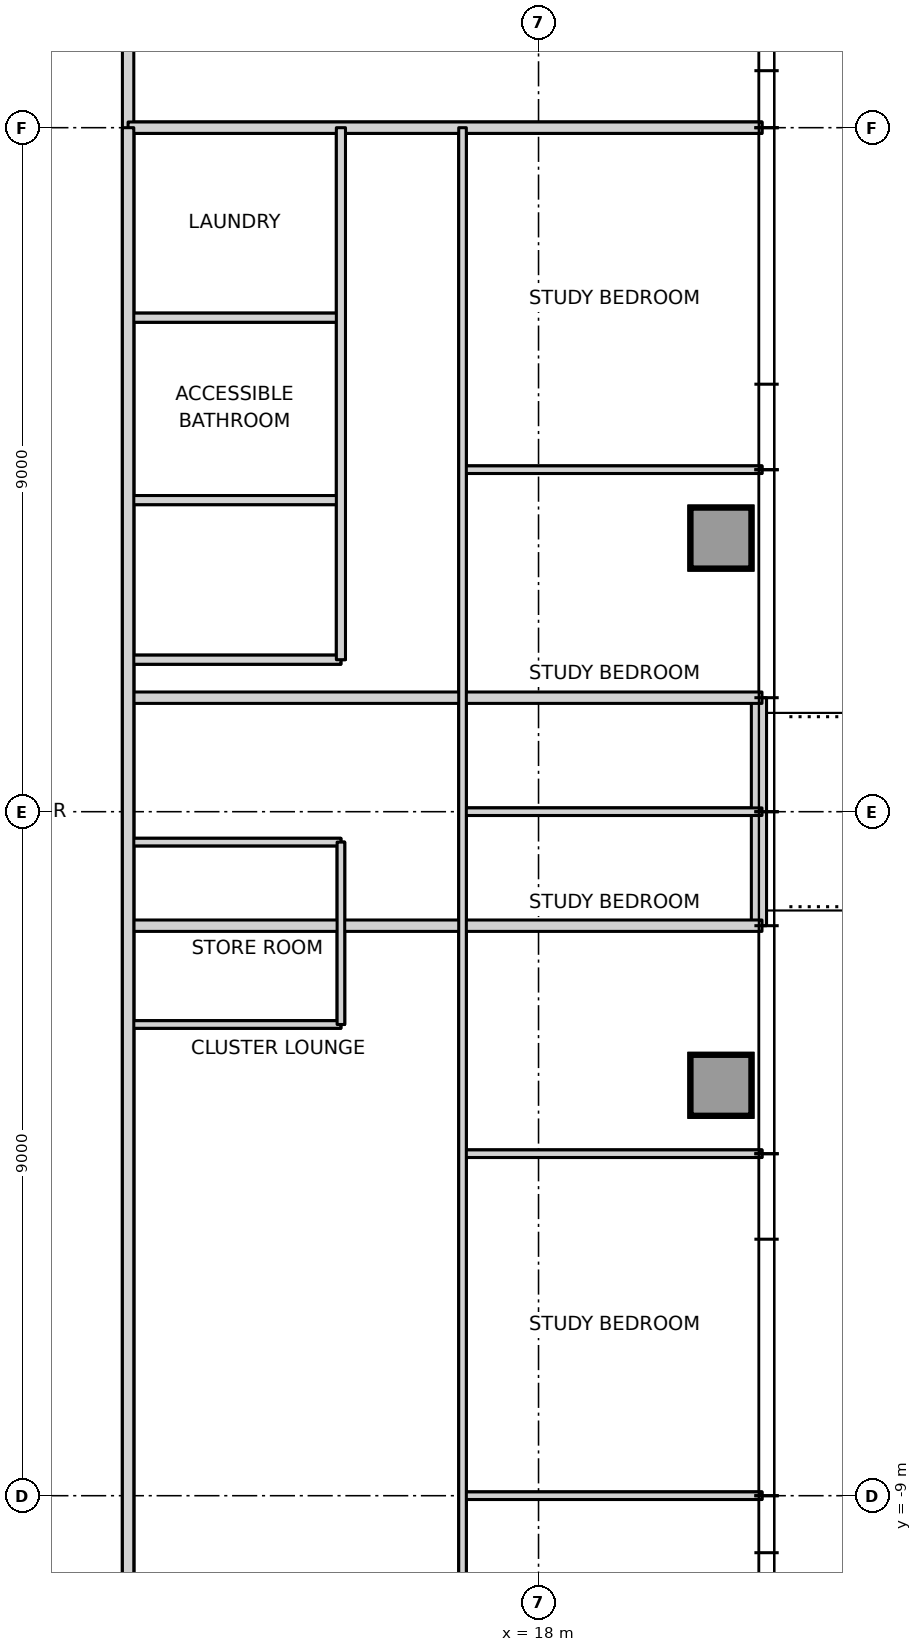
"""IFC4 building model, lengths in metres.
Left out: names, types, materials, properties, quantities, classifications, styles, units other than length and angle.
Written with IfcOpenShell. Run it as: python <this file> out.ifc"""

import sys

from ifc_helpers import new_model, si_unit, direction, frame, frame_2d, origin, origin_2d, place, context, subcontext, project, spatial, rectangle, hollow_rectangle, extrude, element, fill, save


model = new_model("IFC4")
c1 = context("Model", 3, precision=1e-05, world=origin(), true_north=direction((0.0, 1.0)))
c2 = subcontext(c1, "Body", "Model", "MODEL_VIEW")
j1 = project(units=[si_unit("LENGTHUNIT", "METRE"), si_unit("PLANEANGLEUNIT", "RADIAN")], contexts=[c1])
p1 = place(None, origin())
s1 = spatial("IfcSite", under=j1, at=p1, CompositionType="ELEMENT")
p2 = place(p1, origin())
s2 = spatial("IfcBuilding", under=s1, at=p2, CompositionType="ELEMENT")
p3 = place(p2, frame((0.0, 0.0, 94.5)))
s3 = spatial("IfcBuildingStorey", under=s2, at=p3, CompositionType="ELEMENT", Elevation=94.5)
for number, where, z_axis, x_axis in (
    (1, (20.4, -3.6, 0.0), (0.0, 0.0, 1.0), (1.0, 0.0, 0.0)),
    (2, (20.4, 3.6, 0.0), (0.0, 0.0, 1.0), (1.0, 0.0, 0.0)),
):
    element("IfcColumn", number, at=place(p3, frame(where, z_axis=z_axis, x_axis=x_axis)), inside=s3, PredefinedType="COLUMN", context=c2, shape_type="SweptSolid", body=[
        extrude(hollow_rectangle(XDim=0.8, YDim=0.8, WallThickness=0.07, at=origin_2d()), origin(), (0.0, 0.0, 1.0), 3.5),
    ])
for number, where, z_axis, x_axis in (
    (3, (17.0, -9.0, 0.0), (0.0, 0.0, 1.0), (1.0, 0.0, 0.0)),
    (4, (17.0, -4.5, 0.0), (0.0, 0.0, 1.0), (1.0, 0.0, 0.0)),
):
    element("IfcWall", number, at=place(p3, frame(where, z_axis=z_axis, x_axis=x_axis)), inside=s3, PredefinedType="PARTITIONING", context=c2, shape_type="SweptSolid", body=[
        extrude(rectangle(XDim=3.94, YDim=0.1, at=frame_2d((1.97, 0.0))), origin(), (0.0, 0.0, 1.0), 3.27),
    ])
p4 = place(p3, frame((12.6, -2.8, 0.0), z_axis=(0.0, 0.0, 1.0), x_axis=(1.0, 0.0, 0.0)))
e5 = element("IfcWall", 5, at=p4, inside=s3, PredefinedType="PARTITIONING", context=c2, shape_type="SweptSolid", body=[
    extrude(rectangle(XDim=2.8, YDim=0.1, at=frame_2d((1.4, 0.0))), origin(), (0.0, 0.0, 1.0), 3.27),
])
p5 = place(p4, frame((0.975, 0.0, 0.0)))
e6 = element("IfcOpeningElement", 6, at=p5, cuts=e5, PredefinedType="OPENING", context=c2, shape_type="SweptSolid", body=[
    extrude(rectangle(XDim=0.85, YDim=2.1, at=frame_2d((0.425, 1.05))), frame((0.0, 0.06, 0.0), z_axis=(0.0, -1.0, 0.0), x_axis=(1.0, 0.0, 0.0)), (0.0, 0.0, 1.0), 0.12),
])
p6 = place(p3, frame((12.6, -0.4, 0.0), z_axis=(0.0, 0.0, 1.0), x_axis=(1.0, 0.0, 0.0)))
e7 = element("IfcWall", 7, at=p6, inside=s3, PredefinedType="PARTITIONING", context=c2, shape_type="SweptSolid", body=[
    extrude(rectangle(XDim=2.8, YDim=0.1, at=frame_2d((1.4, 0.0))), origin(), (0.0, 0.0, 1.0), 3.27),
])
p7 = place(p3, frame((17.0, 0.0, 0.0), z_axis=(0.0, 0.0, 1.0), x_axis=(1.0, 0.0, 0.0)))
e8 = element("IfcWall", 8, at=p7, inside=s3, PredefinedType="PARTITIONING", context=c2, shape_type="SweptSolid", body=[
    extrude(rectangle(XDim=3.94, YDim=0.1, at=frame_2d((1.97, 0.0))), origin(), (0.0, 0.0, 1.0), 2.587),
])
p8 = place(p3, frame((12.6, 2.0, 0.0), z_axis=(0.0, 0.0, 1.0), x_axis=(1.0, 0.0, 0.0)))
e9 = element("IfcWall", 9, at=p8, inside=s3, PredefinedType="PARTITIONING", context=c2, shape_type="SweptSolid", body=[
    extrude(rectangle(XDim=2.8, YDim=0.12, at=frame_2d((1.4, 0.0))), origin(), (0.0, 0.0, 1.0), 3.27),
])
p9 = place(p8, frame((0.975, 0.0, 0.0)))
e10 = element("IfcOpeningElement", 10, at=p9, cuts=e9, PredefinedType="OPENING", context=c2, shape_type="SweptSolid", body=[
    extrude(rectangle(XDim=0.85, YDim=2.1, at=frame_2d((0.425, 1.05))), frame((0.0, 0.07, 0.0), z_axis=(0.0, -1.0, 0.0), x_axis=(1.0, 0.0, 0.0)), (0.0, 0.0, 1.0), 0.14),
])
p10 = place(p3, frame((12.6, 4.1, 0.0), z_axis=(0.0, 0.0, 1.0), x_axis=(1.0, 0.0, 0.0)))
e11 = element("IfcWall", 11, at=p10, inside=s3, PredefinedType="PARTITIONING", context=c2, shape_type="SweptSolid", body=[
    extrude(rectangle(XDim=2.8, YDim=0.12, at=frame_2d((1.4, 0.0))), origin(), (0.0, 0.0, 1.0), 3.27),
])
p11 = place(p3, frame((17.0, 4.5, 0.0), z_axis=(0.0, 0.0, 1.0), x_axis=(1.0, 0.0, 0.0)))
e12 = element("IfcWall", 12, at=p11, inside=s3, PredefinedType="PARTITIONING", context=c2, shape_type="SweptSolid", body=[
    extrude(rectangle(XDim=3.94, YDim=0.1, at=frame_2d((1.97, 0.0))), origin(), (0.0, 0.0, 1.0), 3.27),
])
p12 = place(p3, frame((12.6, 6.5, 0.0), z_axis=(0.0, 0.0, 1.0), x_axis=(1.0, 0.0, 0.0)))
e13 = element("IfcWall", 13, at=p12, inside=s3, PredefinedType="PARTITIONING", context=c2, shape_type="SweptSolid", body=[
    extrude(rectangle(XDim=2.8, YDim=0.12, at=frame_2d((1.4, 0.0))), origin(), (0.0, 0.0, 1.0), 3.27),
])
p13 = place(p3, frame((12.6, 9.0, 0.0), z_axis=(0.0, 0.0, 1.0), x_axis=(1.0, 0.0, 0.0)))
e14 = element("IfcWall", 14, at=p13, inside=s3, PredefinedType="PARTITIONING", context=c2, shape_type="SweptSolid", body=[
    extrude(rectangle(XDim=8.34, YDim=0.15, at=frame_2d((4.17, 0.0))), origin(), (0.0, 0.0, 1.0), 3.27),
])
p14 = place(p3, frame((17.0, -13.5, 0.0), z_axis=(0.0, 0.0, 1.0), x_axis=(0.0, 1.0, 0.0)))
e15 = element("IfcWall", 15, at=p14, inside=s3, PredefinedType="PARTITIONING", context=c2, shape_type="SweptSolid", body=[
    extrude(rectangle(XDim=22.5, YDim=0.1, at=frame_2d((11.25, 0.0))), origin(), (0.0, 0.0, 1.0), 3.27),
])
p15 = place(p14, frame((1.8, 0.0, 0.0)))
e16 = element("IfcOpeningElement", 16, at=p15, cuts=e15, PredefinedType="OPENING", context=c2, shape_type="SweptSolid", body=[
    extrude(rectangle(XDim=0.9, YDim=2.1, at=frame_2d((0.45, 1.05))), frame((0.0, 0.06, 0.0), z_axis=(0.0, -1.0, 0.0), x_axis=(1.0, 0.0, 0.0)), (0.0, 0.0, 1.0), 0.12),
])
p16 = place(p14, frame((6.3, 0.0, 0.0)))
e17 = element("IfcOpeningElement", 17, at=p16, cuts=e15, PredefinedType="OPENING", context=c2, shape_type="SweptSolid", body=[
    extrude(rectangle(XDim=0.9, YDim=2.1, at=frame_2d((0.45, 1.05))), frame((0.0, 0.06, 0.0), z_axis=(0.0, -1.0, 0.0), x_axis=(1.0, 0.0, 0.0)), (0.0, 0.0, 1.0), 0.12),
])
p17 = place(p14, frame((10.8, 0.0, 0.0)))
e18 = element("IfcOpeningElement", 18, at=p17, cuts=e15, PredefinedType="OPENING", context=c2, shape_type="SweptSolid", body=[
    extrude(rectangle(XDim=0.9, YDim=2.1, at=frame_2d((0.45, 1.05))), frame((0.0, 0.06, 0.0), z_axis=(0.0, -1.0, 0.0), x_axis=(1.0, 0.0, 0.0)), (0.0, 0.0, 1.0), 0.12),
])
p18 = place(p14, frame((15.3, 0.0, 0.0)))
e19 = element("IfcOpeningElement", 19, at=p18, cuts=e15, PredefinedType="OPENING", context=c2, shape_type="SweptSolid", body=[
    extrude(rectangle(XDim=0.9, YDim=2.1, at=frame_2d((0.45, 1.05))), frame((0.0, 0.06, 0.0), z_axis=(0.0, -1.0, 0.0), x_axis=(1.0, 0.0, 0.0)), (0.0, 0.0, 1.0), 0.12),
])
p19 = place(p14, frame((19.8, 0.0, 0.0)))
e20 = element("IfcOpeningElement", 20, at=p19, cuts=e15, PredefinedType="OPENING", context=c2, shape_type="SweptSolid", body=[
    extrude(rectangle(XDim=0.9, YDim=2.1, at=frame_2d((0.45, 1.05))), frame((0.0, 0.06, 0.0), z_axis=(0.0, -1.0, 0.0), x_axis=(1.0, 0.0, 0.0)), (0.0, 0.0, 1.0), 0.12),
])
p20 = place(p3, frame((15.4, -2.8, 0.0), z_axis=(0.0, 0.0, 1.0), x_axis=(0.0, 1.0, 0.0)))
e21 = element("IfcWall", 21, at=p20, inside=s3, PredefinedType="PARTITIONING", context=c2, shape_type="SweptSolid", body=[
    extrude(rectangle(XDim=2.4, YDim=0.1, at=frame_2d((1.2, 0.0))), origin(), (0.0, 0.0, 1.0), 3.27),
])
p21 = place(p3, frame((15.4, 2.0, 0.0), z_axis=(0.0, 0.0, 1.0), x_axis=(0.0, 1.0, 0.0)))
e22 = element("IfcWall", 22, at=p21, inside=s3, PredefinedType="PARTITIONING", context=c2, shape_type="SweptSolid", body=[
    extrude(rectangle(XDim=7.0, YDim=0.12, at=frame_2d((3.5, 0.0))), origin(), (0.0, 0.0, 1.0), 3.27),
])
p22 = place(p21, frame((2.875, 0.0, 0.0)))
e23 = element("IfcOpeningElement", 23, at=p22, cuts=e22, PredefinedType="OPENING", context=c2, shape_type="SweptSolid", body=[
    extrude(rectangle(XDim=0.85, YDim=2.1, at=frame_2d((0.425, 1.05))), frame((0.0, 0.07, 0.0), z_axis=(0.0, -1.0, 0.0), x_axis=(1.0, 0.0, 0.0)), (0.0, 0.0, 1.0), 0.14),
])
p23 = place(p21, frame((5.325, 0.0, 0.0)))
e24 = element("IfcOpeningElement", 24, at=p23, cuts=e22, PredefinedType="OPENING", context=c2, shape_type="SweptSolid", body=[
    extrude(rectangle(XDim=0.85, YDim=2.1, at=frame_2d((0.425, 1.05))), frame((0.0, 0.07, 0.0), z_axis=(0.0, -1.0, 0.0), x_axis=(1.0, 0.0, 0.0)), (0.0, 0.0, 1.0), 0.14),
])
p24 = place(p3, frame((12.6, -12.6, 0.0), z_axis=(0.0, 0.0, 1.0), x_axis=(0.0, 1.0, 0.0)))
e25 = element("IfcWall", 25, at=p24, inside=s3, PredefinedType="PARTITIONING", context=c2, shape_type="SweptSolid", body=[
    extrude(rectangle(XDim=21.6, YDim=0.15, at=frame_2d((10.8, 0.0))), origin(), (0.0, 0.0, 1.0), 3.27),
])
p25 = place(p24, frame((4.9, 0.0, 0.0)))
e26 = element("IfcOpeningElement", 26, at=p25, cuts=e25, PredefinedType="OPENING", context=c2, shape_type="SweptSolid", body=[
    extrude(rectangle(XDim=1.0, YDim=2.1, at=frame_2d((0.5, 1.05))), frame((0.0, 0.085, 0.0), z_axis=(0.0, -1.0, 0.0), x_axis=(1.0, 0.0, 0.0)), (0.0, 0.0, 1.0), 0.17),
])
p26 = place(p16, origin())
e27 = element("IfcDoor", 27, at=p26, inside=s3, OperationType="SINGLE_SWING_LEFT", PredefinedType="DOOR", context=c2, shape_type="SweptSolid", body=[
    extrude(rectangle(XDim=0.9, YDim=2.1, at=frame_2d((0.45, 1.05))), frame((0.0, 0.025, 0.0), z_axis=(0.0, -1.0, 0.0), x_axis=(1.0, 0.0, 0.0)), (0.0, 0.0, 1.0), 0.05),
])
fill(e17, e27)
p27 = place(p17, origin())
e28 = element("IfcDoor", 28, at=p27, inside=s3, OperationType="SINGLE_SWING_LEFT", PredefinedType="DOOR", context=c2, shape_type="SweptSolid", body=[
    extrude(rectangle(XDim=0.9, YDim=2.1, at=frame_2d((0.45, 1.05))), frame((0.0, 0.025, 0.0), z_axis=(0.0, -1.0, 0.0), x_axis=(1.0, 0.0, 0.0)), (0.0, 0.0, 1.0), 0.05),
])
fill(e18, e28)
p28 = place(p18, origin())
e29 = element("IfcDoor", 29, at=p28, inside=s3, OperationType="SINGLE_SWING_RIGHT", PredefinedType="DOOR", context=c2, shape_type="SweptSolid", body=[
    extrude(rectangle(XDim=0.9, YDim=2.1, at=frame_2d((0.45, 1.05))), frame((0.0, 0.025, 0.0), z_axis=(0.0, -1.0, 0.0), x_axis=(1.0, 0.0, 0.0)), (0.0, 0.0, 1.0), 0.05),
])
fill(e19, e29)
p29 = place(p19, origin())
e30 = element("IfcDoor", 30, at=p29, inside=s3, OperationType="SINGLE_SWING_RIGHT", PredefinedType="DOOR", context=c2, shape_type="SweptSolid", body=[
    extrude(rectangle(XDim=0.9, YDim=2.1, at=frame_2d((0.45, 1.05))), frame((0.0, 0.025, 0.0), z_axis=(0.0, -1.0, 0.0), x_axis=(1.0, 0.0, 0.0)), (0.0, 0.0, 1.0), 0.05),
])
fill(e20, e30)
p30 = place(p25, frame((1.0, 0.0, 0.0), z_axis=(0.0, 0.0, 1.0), x_axis=(-1.0, 0.0, 0.0)))
e31 = element("IfcDoor", 31, at=p30, inside=s3, OperationType="SINGLE_SWING_LEFT", PredefinedType="DOOR", context=c2, shape_type="SweptSolid", body=[
    extrude(rectangle(XDim=1.0, YDim=2.1, at=frame_2d((0.5, 1.05))), frame((0.0, 0.025, 0.0), z_axis=(0.0, -1.0, 0.0), x_axis=(1.0, 0.0, 0.0)), (0.0, 0.0, 1.0), 0.05),
])
fill(e26, e31)
p31 = place(p5, frame((0.85, 0.0, 0.0), z_axis=(0.0, 0.0, 1.0), x_axis=(-1.0, 0.0, 0.0)))
e32 = element("IfcDoor", 32, at=p31, inside=s3, OperationType="SINGLE_SWING_RIGHT", PredefinedType="DOOR", context=c2, shape_type="SweptSolid", body=[
    extrude(rectangle(XDim=0.85, YDim=2.1, at=frame_2d((0.425, 1.05))), frame((0.0, 0.025, 0.0), z_axis=(0.0, -1.0, 0.0), x_axis=(1.0, 0.0, 0.0)), (0.0, 0.0, 1.0), 0.05),
])
fill(e6, e32)
p32 = place(p9, frame((0.85, 0.0, 0.0), z_axis=(0.0, 0.0, 1.0), x_axis=(-1.0, 0.0, 0.0)))
e33 = element("IfcDoor", 33, at=p32, inside=s3, OperationType="SINGLE_SWING_RIGHT", PredefinedType="DOOR", context=c2, shape_type="SweptSolid", body=[
    extrude(rectangle(XDim=0.85, YDim=2.1, at=frame_2d((0.425, 1.05))), frame((0.0, 0.025, 0.0), z_axis=(0.0, -1.0, 0.0), x_axis=(1.0, 0.0, 0.0)), (0.0, 0.0, 1.0), 0.05),
])
fill(e10, e33)
p33 = place(p22, frame((0.85, 0.0, 0.0), z_axis=(0.0, 0.0, 1.0), x_axis=(-1.0, 0.0, 0.0)))
e34 = element("IfcDoor", 34, at=p33, inside=s3, OperationType="SINGLE_SWING_LEFT", PredefinedType="DOOR", context=c2, shape_type="SweptSolid", body=[
    extrude(rectangle(XDim=0.85, YDim=2.1, at=frame_2d((0.425, 1.05))), frame((0.0, 0.025, 0.0), z_axis=(0.0, -1.0, 0.0), x_axis=(1.0, 0.0, 0.0)), (0.0, 0.0, 1.0), 0.05),
])
fill(e23, e34)
p34 = place(p23, frame((0.85, 0.0, 0.0), z_axis=(0.0, 0.0, 1.0), x_axis=(-1.0, 0.0, 0.0)))
e35 = element("IfcDoor", 35, at=p34, inside=s3, OperationType="SINGLE_SWING_LEFT", PredefinedType="DOOR", context=c2, shape_type="SweptSolid", body=[
    extrude(rectangle(XDim=0.85, YDim=2.1, at=frame_2d((0.425, 1.05))), frame((0.0, 0.025, 0.0), z_axis=(0.0, -1.0, 0.0), x_axis=(1.0, 0.0, 0.0)), (0.0, 0.0, 1.0), 0.05),
])
fill(e24, e35)
save(model, sys.argv[1])
